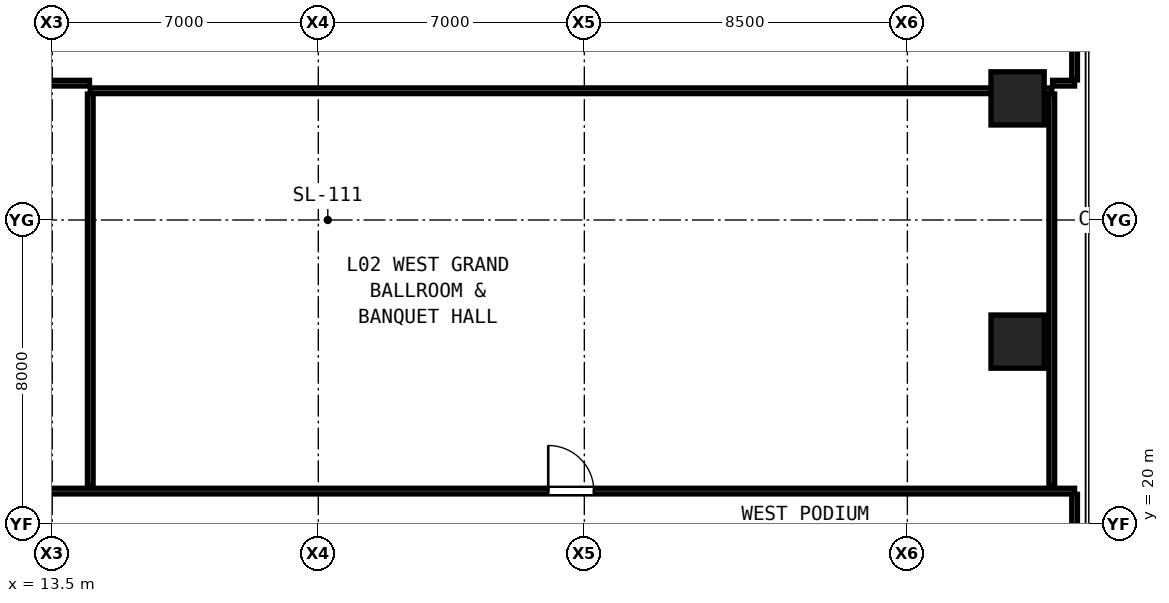
"""IFC4 building model, lengths in metres.
Left out: names, types, materials, properties, quantities, classifications, styles, units other than length and angle.
Written with IfcOpenShell. Run it as: python <this file> out.ifc"""

import sys

from ifc_helpers import new_model, si_unit, direction, frame, frame_2d, origin, origin_2d, place, context, subcontext, project, spatial, rectangle, hollow_rectangle, extrude, element, fill, save


model = new_model("IFC4")
c1 = context("Model", 3, precision=1e-05, world=origin(), true_north=direction((0.0, 1.0)))
c2 = subcontext(c1, "Body", "Model", "MODEL_VIEW")
j1 = project(units=[si_unit("LENGTHUNIT", "METRE"), si_unit("PLANEANGLEUNIT", "RADIAN")], contexts=[c1])
p1 = place(None, origin())
s1 = spatial("IfcSite", under=j1, at=p1, CompositionType="ELEMENT")
p2 = place(p1, origin())
s2 = spatial("IfcBuilding", under=s1, at=p2, CompositionType="ELEMENT")
p3 = place(p2, frame((0.0, 0.0, 9.5)))
s3 = spatial("IfcBuildingStorey", under=s2, at=p3, CompositionType="ELEMENT", Elevation=9.5)
for number, where, z_axis, x_axis in (
    (1, (38.9, 24.8, 0.0), (0.0, 0.0, 1.0), (1.0, 0.0, 0.0)),
    (2, (38.9, 31.2, 0.0), (0.0, 0.0, 1.0), (1.0, 0.0, 0.0)),
):
    element("IfcColumn", number, at=place(p3, frame(where, z_axis=z_axis, x_axis=x_axis)), inside=s3, PredefinedType="COLUMN", context=c2, shape_type="SweptSolid", body=[
        extrude(hollow_rectangle(XDim=1.4, YDim=1.4, WallThickness=0.08, at=origin_2d()), origin(), (0.0, 0.0, 1.0), 4.3),
    ])
p4 = place(p3, frame((10.05, 20.867, 0.0), z_axis=(0.0, 0.0, 1.0), x_axis=(1.0, 0.0, 0.0)))
e3 = element("IfcWall", 3, at=p4, inside=s3, PredefinedType="PARTITIONING", context=c2, shape_type="SweptSolid", body=[
    extrude(rectangle(XDim=30.35, YDim=0.15, at=frame_2d((15.175, 0.0))), origin(), (0.0, 0.0, 1.0), 2.932),
])
p5 = place(p4, frame((0.995, 0.0, 0.0)))
e4 = element("IfcOpeningElement", 4, at=p5, cuts=e3, PredefinedType="OPENING", context=c2, shape_type="SweptSolid", body=[
    extrude(rectangle(XDim=0.9, YDim=2.1, at=frame_2d((0.45, 1.05))), frame((0.0, 0.085, 0.0), z_axis=(0.0, -1.0, 0.0), x_axis=(1.0, 0.0, 0.0)), (0.0, 0.0, 1.0), 0.17),
])
p6 = place(p4, frame((16.5, 0.0, 0.0)))
e5 = element("IfcOpeningElement", 5, at=p6, cuts=e3, PredefinedType="OPENING", context=c2, shape_type="SweptSolid", body=[
    extrude(rectangle(XDim=1.2, YDim=2.25, at=frame_2d((0.6, 1.125))), frame((0.0, 0.085, 0.0), z_axis=(0.0, -1.0, 0.0), x_axis=(1.0, 0.0, 0.0)), (0.0, 0.0, 1.0), 0.17),
])
p7 = place(p3, frame((14.5, 31.4, 0.0), z_axis=(0.0, 0.0, 1.0), x_axis=(1.0, 0.0, 0.0)))
e6 = element("IfcWall", 6, at=p7, inside=s3, PredefinedType="PARTITIONING", context=c2, shape_type="SweptSolid", body=[
    extrude(rectangle(XDim=25.3, YDim=0.15, at=frame_2d((12.65, 0.0))), origin(), (0.0, 0.0, 1.0), 2.932),
])
p8 = place(p3, frame((10.05, 31.6, 0.0), z_axis=(0.0, 0.0, 1.0), x_axis=(1.0, 0.0, 0.0)))
e7 = element("IfcWall", 7, at=p8, inside=s3, PredefinedType="PARTITIONING", context=c2, shape_type="SweptSolid", body=[
    extrude(rectangle(XDim=4.43, YDim=0.15, at=frame_2d((2.215, 0.0))), origin(), (0.0, 0.0, 1.0), 2.932),
])
p9 = place(p3, frame((39.82, 31.6, 0.0), z_axis=(0.0, 0.0, 1.0), x_axis=(1.0, 0.0, 0.0)))
e8 = element("IfcWall", 8, at=p9, inside=s3, PredefinedType="PARTITIONING", context=c2, shape_type="SweptSolid", body=[
    extrude(rectangle(XDim=0.58, YDim=0.15, at=frame_2d((0.29, 0.0))), origin(), (0.0, 0.0, 1.0), 3.98),
])
p10 = place(p3, frame((14.5, 21.0, 0.0), z_axis=(0.0, 0.0, 1.0), x_axis=(0.0, 1.0, 0.0)))
e9 = element("IfcWall", 9, at=p10, inside=s3, PredefinedType="PARTITIONING", context=c2, shape_type="SweptSolid", body=[
    extrude(rectangle(XDim=10.315, YDim=0.15, at=frame_2d((5.157, 0.0))), origin(), (0.0, 0.0, 1.0), 2.932),
])
p11 = place(p3, frame((39.8, 21.0, 0.0), z_axis=(0.0, 0.0, 1.0), x_axis=(0.0, 1.0, 0.0)))
e10 = element("IfcWall", 10, at=p11, inside=s3, PredefinedType="PARTITIONING", context=c2, shape_type="SweptSolid", body=[
    extrude(rectangle(XDim=10.315, YDim=0.15, at=frame_2d((5.157, 0.0))), origin(), (0.0, 0.0, 1.0), 3.98),
])
p12 = place(p3, frame((40.4, 18.485, 0.0), z_axis=(0.0, 0.0, 1.0), x_axis=(0.0, 1.0, 0.0)))
e11 = element("IfcWall", 11, at=p12, inside=s3, PredefinedType="PARTITIONING", context=c2, shape_type="SweptSolid", body=[
    extrude(rectangle(XDim=2.297, YDim=0.15, at=frame_2d((1.148, 0.0))), origin(), (0.0, 0.0, 1.0), 3.024),
])
p13 = place(p3, frame((40.4, 31.685, 0.0), z_axis=(0.0, 0.0, 1.0), x_axis=(0.0, 1.0, 0.0)))
e12 = element("IfcWall", 12, at=p13, inside=s3, PredefinedType="PARTITIONING", context=c2, shape_type="SweptSolid", body=[
    extrude(rectangle(XDim=2.48, YDim=0.15, at=frame_2d((1.24, 0.0))), origin(), (0.0, 0.0, 1.0), 3.98),
])
p14 = place(p6, origin())
e13 = element("IfcDoor", 13, at=p14, inside=s3, OperationType="SINGLE_SWING_LEFT", PredefinedType="DOOR", context=c2, shape_type="SweptSolid", body=[
    extrude(rectangle(XDim=1.2, YDim=2.25, at=frame_2d((0.6, 1.125))), frame((0.0, 0.025, 0.0), z_axis=(0.0, -1.0, 0.0), x_axis=(1.0, 0.0, 0.0)), (0.0, 0.0, 1.0), 0.05),
])
fill(e5, e13)
save(model, sys.argv[1])
